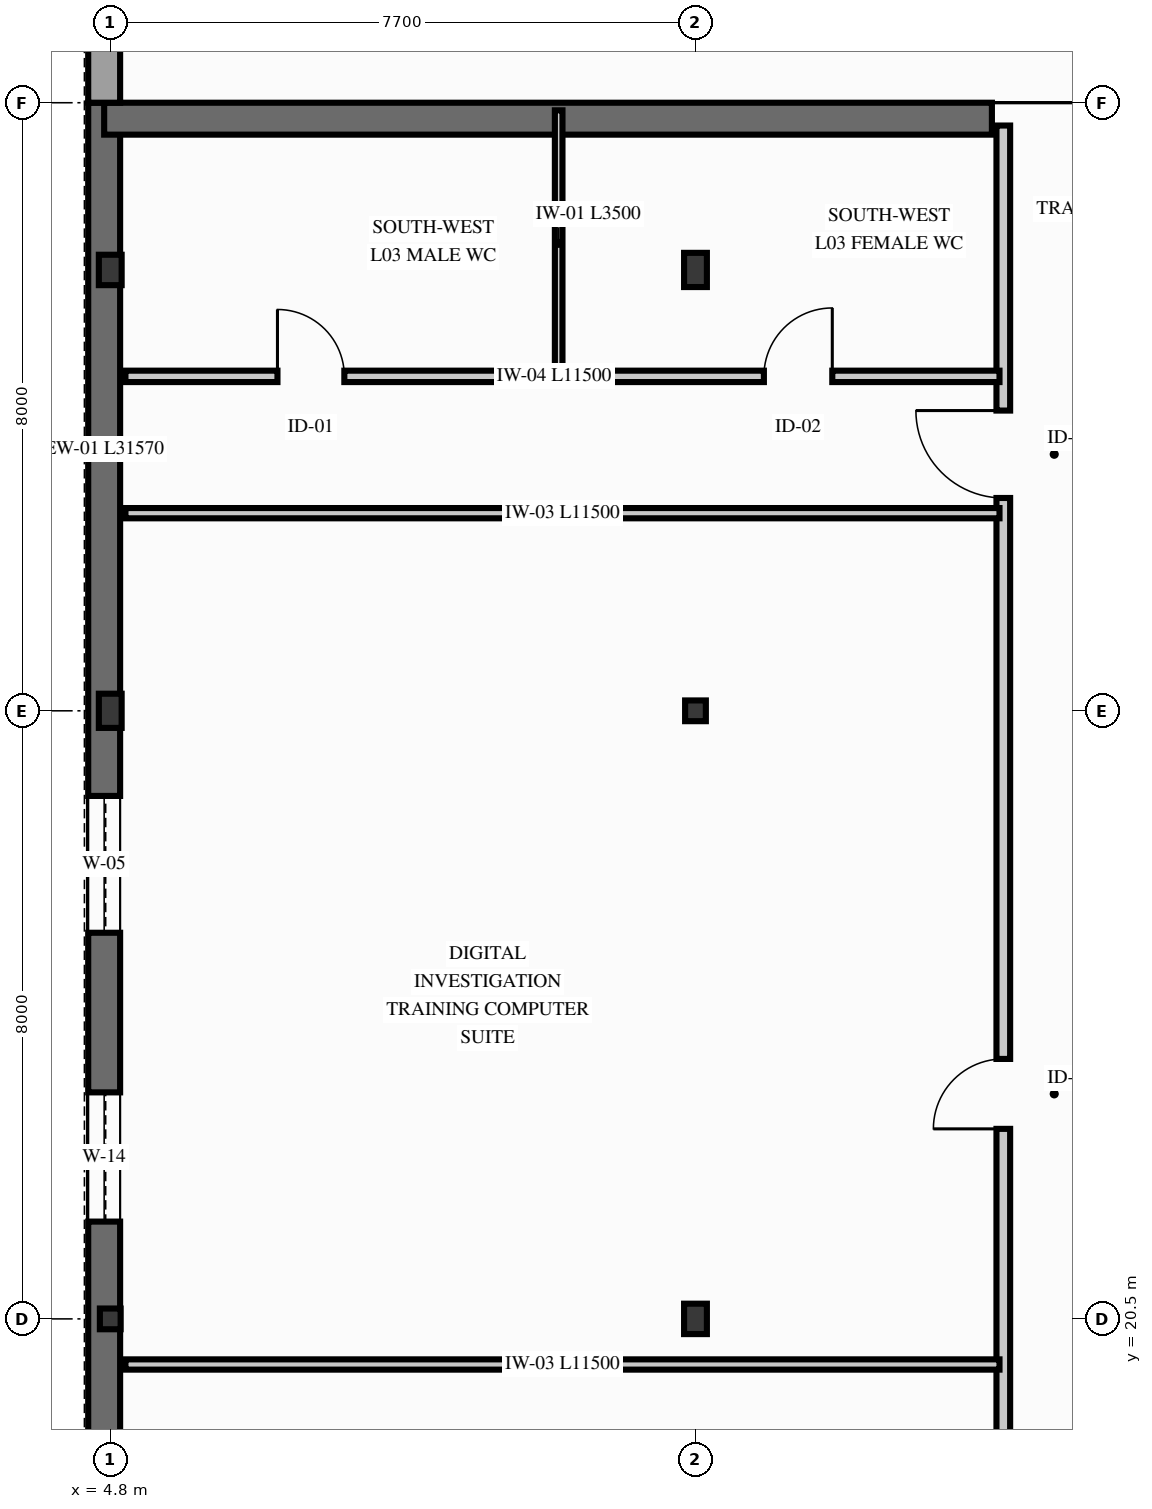
"""IFC4 building model, lengths in metres.
Left out: names, types, materials, properties, quantities, classifications, styles, units other than length and angle.
Written with IfcOpenShell. Run it as: python <this file> out.ifc"""

import sys

from ifc_helpers import new_model, si_unit, direction, frame, frame_2d, origin, origin_2d, place, context, subcontext, project, spatial, rectangle, hollow_circle, i_section, extrude, element, fill, save


model = new_model("IFC4")
c1 = context("Model", 3, precision=1e-05, world=origin(), true_north=direction((0.0, 1.0)))
c2 = subcontext(c1, "Body", "Model", "MODEL_VIEW")
j1 = project(units=[si_unit("LENGTHUNIT", "METRE"), si_unit("PLANEANGLEUNIT", "RADIAN")], contexts=[c1])
p1 = place(None, origin())
s1 = spatial("IfcSite", under=j1, at=p1, CompositionType="ELEMENT")
p2 = place(p1, origin())
s2 = spatial("IfcBuilding", under=s1, at=p2, CompositionType="ELEMENT")
p3 = place(p2, frame((0.0, 0.0, 13.5)))
s3 = spatial("IfcBuildingStorey", under=s2, at=p3, CompositionType="ELEMENT", Elevation=13.5)
p4 = place(p3, frame((4.8, 20.5, 0.0), z_axis=(0.0, 0.0, 1.0), x_axis=(1.0, 0.0, 0.0)))
e1 = element("IfcColumn", 1, at=p4, inside=s3, PredefinedType="COLUMN", context=c2, shape_type="SweptSolid", body=[
    extrude(hollow_circle(Radius=0.136, WallThickness=0.012, at=origin_2d()), origin(), (0.0, 0.0, 1.0), 3.94),
])
p5 = place(p3, frame((4.8, 28.5, 0.0), z_axis=(0.0, 0.0, 1.0), x_axis=(1.0, 0.0, 0.0)))
e2 = element("IfcColumn", 2, at=p5, inside=s3, PredefinedType="COLUMN", context=c2, shape_type="SweptSolid", body=[
    extrude(i_section(OverallWidth=0.3, OverallDepth=0.45, WebThickness=0.014, FlangeThickness=0.026, FilletRadius=0.027, at=origin_2d()), origin(), (0.0, 0.0, 1.0), 3.94),
])
for number, where, z_axis, x_axis in (
    (3, (4.8, 34.3, 0.0), (0.0, 0.0, 1.0), (1.0, 0.0, 0.0)),
    (4, (12.5, 20.5, 0.0), (0.0, 0.0, 1.0), (1.0, 0.0, 0.0)),
):
    element("IfcColumn", number, at=place(p3, frame(where, z_axis=z_axis, x_axis=x_axis)), inside=s3, PredefinedType="COLUMN", context=c2, shape_type="SweptSolid", body=[
        extrude(i_section(OverallWidth=0.3, OverallDepth=0.4, WebThickness=0.013, FlangeThickness=0.024, FilletRadius=0.027, at=origin_2d()), origin(), (0.0, 0.0, 1.0), 3.94),
    ])
p6 = place(p3, frame((12.5, 28.5, 0.0), z_axis=(0.0, 0.0, 1.0), x_axis=(1.0, 0.0, 0.0)))
e5 = element("IfcColumn", 5, at=p6, inside=s3, PredefinedType="COLUMN", context=c2, shape_type="SweptSolid", body=[
    extrude(hollow_circle(Radius=0.136, WallThickness=0.012, at=origin_2d()), origin(), (0.0, 0.0, 1.0), 3.94),
])
p7 = place(p3, frame((12.5, 34.3, 0.0), z_axis=(0.0, 0.0, 1.0), x_axis=(1.0, 0.0, 0.0)))
e6 = element("IfcColumn", 6, at=p7, inside=s3, PredefinedType="COLUMN", context=c2, shape_type="SweptSolid", body=[
    extrude(i_section(OverallWidth=0.3, OverallDepth=0.45, WebThickness=0.014, FlangeThickness=0.026, FilletRadius=0.027, at=origin_2d()), origin(), (0.0, 0.0, 1.0), 3.94),
])
p8 = place(p3, frame((4.72, 4.93, 0.0), z_axis=(0.0, 0.0, 1.0), x_axis=(0.0, 1.0, 0.0)))
e7 = element("IfcWall", 7, at=p8, inside=s3, PredefinedType="SOLIDWALL", context=c2, shape_type="SweptSolid", body=[
    extrude(rectangle(XDim=31.57, YDim=0.42, at=frame_2d((15.785, 0.0))), origin(), (0.0, 0.0, 1.0), 3.9),
])
p9 = place(p8, frame((1.65, 0.0, 0.85)))
e8 = element("IfcOpeningElement", 8, at=p9, cuts=e7, PredefinedType="OPENING", context=c2, shape_type="SweptSolid", body=[
    extrude(rectangle(XDim=1.3, YDim=2.15, at=frame_2d((0.65, 1.075))), frame((0.0, 0.22, 0.0), z_axis=(0.0, -1.0, 0.0), x_axis=(1.0, 0.0, 0.0)), (0.0, 0.0, 1.0), 0.44),
])
p10 = place(p8, frame((5.45, 0.0, 0.85)))
e9 = element("IfcOpeningElement", 9, at=p10, cuts=e7, PredefinedType="OPENING", context=c2, shape_type="SweptSolid", body=[
    extrude(rectangle(XDim=1.5, YDim=2.3, at=frame_2d((0.75, 1.15))), frame((0.0, 0.22, 0.0), z_axis=(0.0, -1.0, 0.0), x_axis=(1.0, 0.0, 0.0)), (0.0, 0.0, 1.0), 0.44),
])
p11 = place(p8, frame((9.25, 0.0, 0.85)))
e10 = element("IfcOpeningElement", 10, at=p11, cuts=e7, PredefinedType="OPENING", context=c2, shape_type="SweptSolid", body=[
    extrude(rectangle(XDim=1.6, YDim=2.4, at=frame_2d((0.8, 1.2))), frame((0.0, 0.22, 0.0), z_axis=(0.0, -1.0, 0.0), x_axis=(1.0, 0.0, 0.0)), (0.0, 0.0, 1.0), 0.44),
])
p12 = place(p8, frame((16.85, 0.0, 0.85)))
e11 = element("IfcOpeningElement", 11, at=p12, cuts=e7, PredefinedType="OPENING", context=c2, shape_type="SweptSolid", body=[
    extrude(rectangle(XDim=1.7, YDim=2.35, at=frame_2d((0.85, 1.175))), frame((0.0, 0.22, 0.0), z_axis=(0.0, -1.0, 0.0), x_axis=(1.0, 0.0, 0.0)), (0.0, 0.0, 1.0), 0.44),
])
p13 = place(p8, frame((20.65, 0.0, 0.85)))
e12 = element("IfcOpeningElement", 12, at=p13, cuts=e7, PredefinedType="OPENING", context=c2, shape_type="SweptSolid", body=[
    extrude(rectangle(XDim=1.8, YDim=2.4, at=frame_2d((0.9, 1.2))), frame((0.0, 0.22, 0.0), z_axis=(0.0, -1.0, 0.0), x_axis=(1.0, 0.0, 0.0)), (0.0, 0.0, 1.0), 0.44),
])
p14 = place(p3, frame((4.72, 36.29, 0.0), z_axis=(0.0, 0.0, 1.0), x_axis=(1.0, 0.0, 0.0)))
e13 = element("IfcWall", 13, at=p14, inside=s3, PredefinedType="SOLIDWALL", context=c2, shape_type="SweptSolid", body=[
    extrude(rectangle(XDim=11.68, YDim=0.42, at=frame_2d((5.84, 0.0))), origin(), (0.0, 0.0, 1.0), 3.9),
])
p15 = place(p3, frame((4.72, 36.5, 0.0), z_axis=(0.0, 0.0, 1.0), x_axis=(0.0, 1.0, 0.0)))
e14 = element("IfcWall", 14, at=p15, inside=s3, PredefinedType="SOLIDWALL", context=c2, shape_type="SweptSolid", body=[
    extrude(rectangle(XDim=47.0, YDim=0.42, at=frame_2d((23.5, 0.0))), origin(), (0.0, 0.0, 1.0), 3.72),
])
p16 = place(p15, frame((1.65, 0.0, 0.74)))
e15 = element("IfcOpeningElement", 15, at=p16, cuts=e14, PredefinedType="OPENING", context=c2, shape_type="SweptSolid", body=[
    extrude(rectangle(XDim=1.6, YDim=2.4, at=frame_2d((0.8, 1.2))), frame((0.0, 0.22, 0.0), z_axis=(0.0, -1.0, 0.0), x_axis=(1.0, 0.0, 0.0)), (0.0, 0.0, 1.0), 0.44),
])
p17 = place(p15, frame((5.5, 0.0, 0.74)))
e16 = element("IfcOpeningElement", 16, at=p17, cuts=e14, PredefinedType="OPENING", context=c2, shape_type="SweptSolid", body=[
    extrude(rectangle(XDim=1.8, YDim=2.4, at=frame_2d((0.9, 1.2))), frame((0.0, 0.22, 0.0), z_axis=(0.0, -1.0, 0.0), x_axis=(1.0, 0.0, 0.0)), (0.0, 0.0, 1.0), 0.44),
])
p18 = place(p15, frame((9.35, 0.0, 0.84)))
e17 = element("IfcOpeningElement", 17, at=p18, cuts=e14, PredefinedType="OPENING", context=c2, shape_type="SweptSolid", body=[
    extrude(rectangle(XDim=1.5, YDim=2.3, at=frame_2d((0.75, 1.15))), frame((0.0, 0.22, 0.0), z_axis=(0.0, -1.0, 0.0), x_axis=(1.0, 0.0, 0.0)), (0.0, 0.0, 1.0), 0.44),
])
p19 = place(p15, frame((20.9, 0.0, 0.74)))
e18 = element("IfcOpeningElement", 18, at=p19, cuts=e14, PredefinedType="OPENING", context=c2, shape_type="SweptSolid", body=[
    extrude(rectangle(XDim=2.4, YDim=2.4, at=frame_2d((1.2, 1.2))), frame((0.0, 0.22, 0.0), z_axis=(0.0, -1.0, 0.0), x_axis=(1.0, 0.0, 0.0)), (0.0, 0.0, 1.0), 0.44),
])
p20 = place(p15, frame((24.75, 0.0, 0.74)))
e19 = element("IfcOpeningElement", 19, at=p20, cuts=e14, PredefinedType="OPENING", context=c2, shape_type="SweptSolid", body=[
    extrude(rectangle(XDim=1.6, YDim=2.4, at=frame_2d((0.8, 1.2))), frame((0.0, 0.22, 0.0), z_axis=(0.0, -1.0, 0.0), x_axis=(1.0, 0.0, 0.0)), (0.0, 0.0, 1.0), 0.44),
])
p21 = place(p15, frame((40.15, 0.0, 0.54)))
e20 = element("IfcOpeningElement", 20, at=p21, cuts=e14, PredefinedType="OPENING", context=c2, shape_type="SweptSolid", body=[
    extrude(rectangle(XDim=2.2, YDim=2.6, at=frame_2d((1.1, 1.3))), frame((0.0, 0.22, 0.0), z_axis=(0.0, -1.0, 0.0), x_axis=(1.0, 0.0, 0.0)), (0.0, 0.0, 1.0), 0.44),
])
p22 = place(p3, frame((16.55, 5.0, 0.0), z_axis=(0.0, 0.0, 1.0), x_axis=(0.0, 1.0, 0.0)))
e21 = element("IfcWall", 21, at=p22, inside=s3, PredefinedType="PARTITIONING", context=c2, shape_type="SweptSolid", body=[
    extrude(rectangle(XDim=31.2, YDim=0.18, at=frame_2d((15.6, 0.0))), origin(), (0.0, 0.0, 1.0), 3.478),
])
p23 = place(p22, frame((6.5, 0.0, 0.0)))
e22 = element("IfcOpeningElement", 22, at=p23, cuts=e21, PredefinedType="OPENING", context=c2, shape_type="SweptSolid", body=[
    extrude(rectangle(XDim=1.48, YDim=2.28, at=frame_2d((0.74, 1.14))), frame((0.0, 0.1, 0.0), z_axis=(0.0, -1.0, 0.0), x_axis=(1.0, 0.0, 0.0)), (0.0, 0.0, 1.0), 0.2),
])
p24 = place(p22, frame((18.0, 0.0, 0.0)))
e23 = element("IfcOpeningElement", 23, at=p24, cuts=e21, PredefinedType="OPENING", context=c2, shape_type="SweptSolid", body=[
    extrude(rectangle(XDim=0.92, YDim=2.12, at=frame_2d((0.46, 1.06))), frame((0.0, 0.1, 0.0), z_axis=(0.0, -1.0, 0.0), x_axis=(1.0, 0.0, 0.0)), (0.0, 0.0, 1.0), 0.2),
])
p25 = place(p22, frame((26.3, 0.0, 0.0)))
e24 = element("IfcOpeningElement", 24, at=p25, cuts=e21, PredefinedType="OPENING", context=c2, shape_type="SweptSolid", body=[
    extrude(rectangle(XDim=1.15, YDim=2.2, at=frame_2d((0.575, 1.1))), frame((0.0, 0.1, 0.0), z_axis=(0.0, -1.0, 0.0), x_axis=(1.0, 0.0, 0.0)), (0.0, 0.0, 1.0), 0.2),
])
p26 = place(p3, frame((5.0, 19.9, 0.0), z_axis=(0.0, 0.0, 1.0), x_axis=(1.0, 0.0, 0.0)))
e25 = element("IfcWall", 25, at=p26, inside=s3, PredefinedType="PARTITIONING", context=c2, shape_type="SweptSolid", body=[
    extrude(rectangle(XDim=11.5, YDim=0.135, at=frame_2d((5.75, 0.0))), origin(), (0.0, 0.0, 1.0), 3.378),
])
p27 = place(p3, frame((5.0, 32.9, 0.0), z_axis=(0.0, 0.0, 1.0), x_axis=(1.0, 0.0, 0.0)))
e26 = element("IfcWall", 26, at=p27, inside=s3, PredefinedType="PARTITIONING", context=c2, shape_type="SweptSolid", body=[
    extrude(rectangle(XDim=11.5, YDim=0.15, at=frame_2d((5.75, 0.0))), origin(), (0.0, 0.0, 1.0), 3.378),
])
p28 = place(p27, frame((2.0, 0.0, 0.0)))
e27 = element("IfcOpeningElement", 27, at=p28, cuts=e26, PredefinedType="OPENING", context=c2, shape_type="SweptSolid", body=[
    extrude(rectangle(XDim=0.88, YDim=2.1, at=frame_2d((0.44, 1.05))), frame((0.0, 0.085, 0.0), z_axis=(0.0, -1.0, 0.0), x_axis=(1.0, 0.0, 0.0)), (0.0, 0.0, 1.0), 0.17),
])
p29 = place(p27, frame((8.4, 0.0, 0.0)))
e28 = element("IfcOpeningElement", 28, at=p29, cuts=e26, PredefinedType="OPENING", context=c2, shape_type="SweptSolid", body=[
    extrude(rectangle(XDim=0.9, YDim=2.1, at=frame_2d((0.45, 1.05))), frame((0.0, 0.085, 0.0), z_axis=(0.0, -1.0, 0.0), x_axis=(1.0, 0.0, 0.0)), (0.0, 0.0, 1.0), 0.17),
])
p30 = place(p3, frame((10.7, 32.9, 0.0), z_axis=(0.0, 0.0, 1.0), x_axis=(0.0, 1.0, 0.0)))
e29 = element("IfcWall", 29, at=p30, inside=s3, PredefinedType="PARTITIONING", context=c2, shape_type="SweptSolid", body=[
    extrude(rectangle(XDim=3.5, YDim=0.1, at=frame_2d((1.75, 0.0))), origin(), (0.0, 0.0, 1.0), 3.98),
])
p31 = place(p3, frame((5.0, 31.1, 0.0), z_axis=(0.0, 0.0, 1.0), x_axis=(1.0, 0.0, 0.0)))
e30 = element("IfcWall", 30, at=p31, inside=s3, PredefinedType="PARTITIONING", context=c2, shape_type="SweptSolid", body=[
    extrude(rectangle(XDim=11.5, YDim=0.135, at=frame_2d((5.75, 0.0))), origin(), (0.0, 0.0, 1.0), 3.378),
])
p32 = place(p12, origin())
e31 = element("IfcWindow", 31, at=p32, inside=s3, PartitioningType="SINGLE_PANEL", PredefinedType="WINDOW", context=c2, shape_type="SweptSolid", body=[
    extrude(rectangle(XDim=1.7, YDim=2.35, at=frame_2d((0.85, 1.175))), frame((0.0, 0.03, 0.0), z_axis=(0.0, -1.0, 0.0), x_axis=(1.0, 0.0, 0.0)), (0.0, 0.0, 1.0), 0.06),
])
fill(e11, e31)
p33 = place(p13, origin())
e32 = element("IfcWindow", 32, at=p33, inside=s3, PartitioningType="SINGLE_PANEL", PredefinedType="WINDOW", context=c2, shape_type="SweptSolid", body=[
    extrude(rectangle(XDim=1.8, YDim=2.4, at=frame_2d((0.9, 1.2))), frame((0.0, 0.03, 0.0), z_axis=(0.0, -1.0, 0.0), x_axis=(1.0, 0.0, 0.0)), (0.0, 0.0, 1.0), 0.06),
])
fill(e12, e32)
p34 = place(p3, frame((12.344, 11.705, 6.319), z_axis=(-0.281250993097, 0.0, 0.959634242241), x_axis=(-0.726259822262, -0.653636100345, -0.212853280204)))
p35 = place(p34, frame((-2.717, -9.274, 0.0)))
p36 = place(p35, frame((0.0, 0.0, 0.02)))
e33 = element("IfcWindow", 33, at=p36, inside=s3, PartitioningType="SINGLE_PANEL", PredefinedType="SKYLIGHT", context=c2, shape_type="SweptSolid", body=[
    extrude(rectangle(XDim=1.8, YDim=2.2, at=origin_2d()), origin(), (0.0, 0.0, 1.0), 0.08),
])
p37 = place(p3, frame((12.556, 29.195, 6.319), z_axis=(0.281259054176, 0.0, 0.959631879652), x_axis=(0.726249140985, 0.653646830346, -0.212856774375)))
p38 = place(p37, frame((-2.573, -9.267, 0.0)))
p39 = place(p38, frame((0.0, 0.0, 0.02)))
e34 = element("IfcWindow", 34, at=p39, inside=s3, PartitioningType="SINGLE_PANEL", PredefinedType="SKYLIGHT", context=c2, shape_type="SweptSolid", body=[
    extrude(rectangle(XDim=2.0, YDim=2.4, at=origin_2d()), origin(), (0.0, 0.0, 1.0), 0.08),
])
p40 = place(p24, origin())
e35 = element("IfcDoor", 35, at=p40, inside=s3, OperationType="SINGLE_SWING_LEFT", PredefinedType="DOOR", context=c2, shape_type="SweptSolid", body=[
    extrude(rectangle(XDim=0.92, YDim=2.12, at=frame_2d((0.46, 1.06))), frame((0.0, 0.025, 0.0), z_axis=(0.0, -1.0, 0.0), x_axis=(1.0, 0.0, 0.0)), (0.0, 0.0, 1.0), 0.05),
])
fill(e23, e35)
p41 = place(p25, origin())
e36 = element("IfcDoor", 36, at=p41, inside=s3, OperationType="SINGLE_SWING_RIGHT", PredefinedType="DOOR", context=c2, shape_type="SweptSolid", body=[
    extrude(rectangle(XDim=1.15, YDim=2.2, at=frame_2d((0.575, 1.1))), frame((0.0, 0.025, 0.0), z_axis=(0.0, -1.0, 0.0), x_axis=(1.0, 0.0, 0.0)), (0.0, 0.0, 1.0), 0.05),
])
fill(e24, e36)
p42 = place(p28, origin())
e37 = element("IfcDoor", 37, at=p42, inside=s3, OperationType="SINGLE_SWING_LEFT", PredefinedType="DOOR", context=c2, shape_type="SweptSolid", body=[
    extrude(rectangle(XDim=0.88, YDim=2.1, at=frame_2d((0.44, 1.05))), frame((0.0, 0.025, 0.0), z_axis=(0.0, -1.0, 0.0), x_axis=(1.0, 0.0, 0.0)), (0.0, 0.0, 1.0), 0.05),
])
fill(e27, e37)
p43 = place(p29, origin())
e38 = element("IfcDoor", 38, at=p43, inside=s3, OperationType="SINGLE_SWING_RIGHT", PredefinedType="DOOR", context=c2, shape_type="SweptSolid", body=[
    extrude(rectangle(XDim=0.9, YDim=2.1, at=frame_2d((0.45, 1.05))), frame((0.0, 0.025, 0.0), z_axis=(0.0, -1.0, 0.0), x_axis=(1.0, 0.0, 0.0)), (0.0, 0.0, 1.0), 0.05),
])
fill(e28, e38)
save(model, sys.argv[1])
